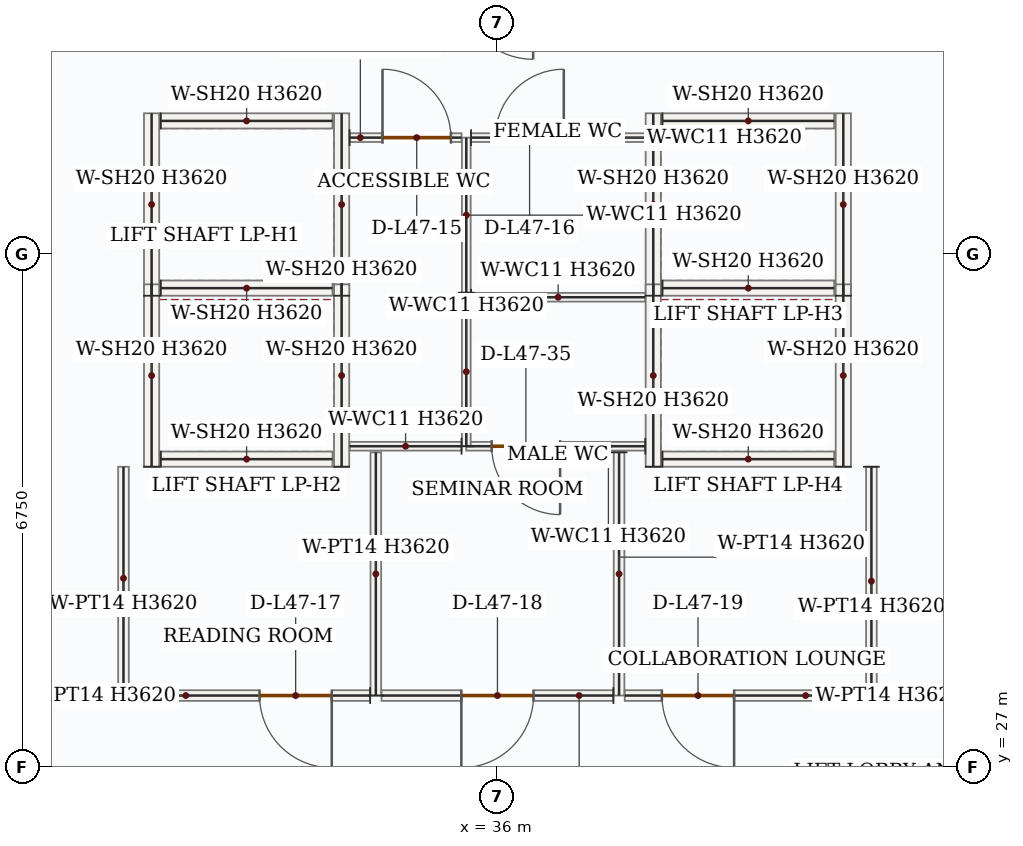
"""IFC4 building model, lengths in metres.
Left out: names, types, materials, properties, quantities, classifications, styles, units other than length and angle.
Written with IfcOpenShell. Run it as: python <this file> out.ifc"""

import sys

from ifc_helpers import new_model, si_unit, direction, frame, frame_2d, origin, place, context, subcontext, project, spatial, rectangle, extrude, source, transform, mapped, element, fill, save


model = new_model("IFC4")
c1 = context("Model", 3, precision=1e-05, world=origin(), true_north=direction((0.0, 1.0)))
c2 = subcontext(c1, "Body", "Model", "MODEL_VIEW")
j1 = project(units=[si_unit("LENGTHUNIT", "METRE"), si_unit("PLANEANGLEUNIT", "RADIAN")], contexts=[c1])
p1 = place(None, origin())
s1 = spatial("IfcSite", under=j1, at=p1, CompositionType="ELEMENT")
p2 = place(p1, origin())
s2 = spatial("IfcBuilding", under=s1, at=p2, CompositionType="ELEMENT")
p3 = place(p2, frame((0.0, 0.0, 201.9)))
s3 = spatial("IfcBuildingStorey", under=s2, at=p3, CompositionType="ELEMENT", Elevation=201.9)
m1 = source(origin(), c2, "Body", "SweptSolid", [
    extrude(rectangle(XDim=2.4, YDim=0.2, at=frame_2d((1.2, 0.0))), origin(), (0.0, 0.0, 1.0), 3.62),
])
for number, where, z_axis, x_axis in (
    (1, (31.45, 33.2, 0.0), (0.0, 0.0, 1.0), (0.0, 1.0, 0.0)),
    (2, (33.95, 33.2, 0.0), (0.0, 0.0, 1.0), (0.0, 1.0, 0.0)),
):
    element("IfcWall", number, at=place(p3, frame(where, z_axis=z_axis, x_axis=x_axis)), inside=s3, PredefinedType="SOLIDWALL", context=c2, shape_type="MappedRepresentation", body=[
        mapped(m1, transform((0.0, 0.0, 0.0), x_axis=(1.0, 0.0, 0.0), y_axis=(0.0, 1.0, 0.0), z_axis=(0.0, 0.0, 1.0), scale=1.0)),
    ])
m2 = source(origin(), c2, "Body", "SweptSolid", [
    extrude(rectangle(XDim=2.26, YDim=0.2, at=frame_2d((1.13, 0.0))), origin(), (0.0, 0.0, 1.0), 3.62),
])
for number, where, z_axis, x_axis in (
    (3, (31.57, 33.3, 0.0), (0.0, 0.0, 1.0), (1.0, 0.0, 0.0)),
    (4, (31.57, 35.5, 0.0), (0.0, 0.0, 1.0), (1.0, 0.0, 0.0)),
):
    element("IfcWall", number, at=place(p3, frame(where, z_axis=z_axis, x_axis=x_axis)), inside=s3, PredefinedType="SOLIDWALL", context=c2, shape_type="MappedRepresentation", body=[
        mapped(m2, transform((0.0, 0.0, 0.0), x_axis=(1.0, 0.0, 0.0), y_axis=(0.0, 1.0, 0.0), z_axis=(0.0, 0.0, 1.0), scale=1.0)),
    ])
for number, where, z_axis, x_axis in (
    (5, (31.45, 30.95, 0.0), (0.0, 0.0, 1.0), (0.0, 1.0, 0.0)),
    (6, (33.95, 30.95, 0.0), (0.0, 0.0, 1.0), (0.0, 1.0, 0.0)),
):
    element("IfcWall", number, at=place(p3, frame(where, z_axis=z_axis, x_axis=x_axis)), inside=s3, PredefinedType="SOLIDWALL", context=c2, shape_type="MappedRepresentation", body=[
        mapped(m1, transform((0.0, 0.0, 0.0), x_axis=(1.0, 0.0, 0.0), y_axis=(0.0, 1.0, 0.0), z_axis=(0.0, 0.0, 1.0), scale=1.0)),
    ])
p4 = place(p3, frame((31.57, 31.05, 0.0), z_axis=(0.0, 0.0, 1.0), x_axis=(1.0, 0.0, 0.0)))
e7 = element("IfcWall", 7, at=p4, inside=s3, PredefinedType="SOLIDWALL", context=c2, shape_type="MappedRepresentation", body=[
    mapped(m2, transform((0.0, 0.0, 0.0), x_axis=(1.0, 0.0, 0.0), y_axis=(0.0, 1.0, 0.0), z_axis=(0.0, 0.0, 1.0), scale=1.0)),
])
for number, where, z_axis, x_axis in (
    (8, (38.05, 33.2, 0.0), (0.0, 0.0, 1.0), (0.0, 1.0, 0.0)),
    (9, (40.55, 33.2, 0.0), (0.0, 0.0, 1.0), (0.0, 1.0, 0.0)),
):
    element("IfcWall", number, at=place(p3, frame(where, z_axis=z_axis, x_axis=x_axis)), inside=s3, PredefinedType="SOLIDWALL", context=c2, shape_type="MappedRepresentation", body=[
        mapped(m1, transform((0.0, 0.0, 0.0), x_axis=(1.0, 0.0, 0.0), y_axis=(0.0, 1.0, 0.0), z_axis=(0.0, 0.0, 1.0), scale=1.0)),
    ])
for number, where, z_axis, x_axis in (
    (10, (38.17, 33.3, 0.0), (0.0, 0.0, 1.0), (1.0, 0.0, 0.0)),
    (11, (38.17, 35.5, 0.0), (0.0, 0.0, 1.0), (1.0, 0.0, 0.0)),
):
    element("IfcWall", number, at=place(p3, frame(where, z_axis=z_axis, x_axis=x_axis)), inside=s3, PredefinedType="SOLIDWALL", context=c2, shape_type="MappedRepresentation", body=[
        mapped(m2, transform((0.0, 0.0, 0.0), x_axis=(1.0, 0.0, 0.0), y_axis=(0.0, 1.0, 0.0), z_axis=(0.0, 0.0, 1.0), scale=1.0)),
    ])
for number, where, z_axis, x_axis in (
    (12, (38.05, 30.95, 0.0), (0.0, 0.0, 1.0), (0.0, 1.0, 0.0)),
    (13, (40.55, 30.95, 0.0), (0.0, 0.0, 1.0), (0.0, 1.0, 0.0)),
):
    element("IfcWall", number, at=place(p3, frame(where, z_axis=z_axis, x_axis=x_axis)), inside=s3, PredefinedType="SOLIDWALL", context=c2, shape_type="MappedRepresentation", body=[
        mapped(m1, transform((0.0, 0.0, 0.0), x_axis=(1.0, 0.0, 0.0), y_axis=(0.0, 1.0, 0.0), z_axis=(0.0, 0.0, 1.0), scale=1.0)),
    ])
p5 = place(p3, frame((38.17, 31.05, 0.0), z_axis=(0.0, 0.0, 1.0), x_axis=(1.0, 0.0, 0.0)))
e14 = element("IfcWall", 14, at=p5, inside=s3, PredefinedType="SOLIDWALL", context=c2, shape_type="MappedRepresentation", body=[
    mapped(m2, transform((0.0, 0.0, 0.0), x_axis=(1.0, 0.0, 0.0), y_axis=(0.0, 1.0, 0.0), z_axis=(0.0, 0.0, 1.0), scale=1.0)),
])
p6 = place(p3, frame((37.945, 31.22, 0.0), z_axis=(0.0, 0.0, 1.0), x_axis=(-1.0, 0.0, 0.0)))
e15 = element("IfcWall", 15, at=p6, inside=s3, PredefinedType="PARTITIONING", context=c2, shape_type="SweptSolid", body=[
    extrude(rectangle(XDim=2.355, YDim=0.115, at=frame_2d((1.177, 0.0))), origin(), (0.0, 0.0, 1.0), 3.62),
])
p7 = place(p6, frame((1.121, 0.0, 0.0)))
e16 = element("IfcOpeningElement", 16, at=p7, cuts=e15, PredefinedType="OPENING", context=c2, shape_type="SweptSolid", body=[
    extrude(rectangle(XDim=0.9, YDim=2.1, at=frame_2d((0.45, 1.05))), frame((0.0, 0.067, 0.0), z_axis=(0.0, -1.0, 0.0), x_axis=(1.0, 0.0, 0.0)), (0.0, 0.0, 1.0), 0.135),
])
m3 = source(origin(), c2, "Body", "SweptSolid", [
    extrude(rectangle(XDim=1.96, YDim=0.115, at=frame_2d((0.98, 0.0))), origin(), (0.0, 0.0, 1.0), 3.62),
])
p8 = place(p3, frame((35.59, 31.22, 0.0), z_axis=(0.0, 0.0, 1.0), x_axis=(0.0, 1.0, 0.0)))
e17 = element("IfcWall", 17, at=p8, inside=s3, PredefinedType="PARTITIONING", context=c2, shape_type="MappedRepresentation", body=[
    mapped(m3, transform((0.0, 0.0, 0.0), x_axis=(1.0, 0.0, 0.0), y_axis=(0.0, 1.0, 0.0), z_axis=(0.0, 0.0, 1.0), scale=1.0)),
])
m4 = source(origin(), c2, "Body", "SweptSolid", [
    extrude(rectangle(XDim=2.292, YDim=0.115, at=frame_2d((1.146, 0.0))), origin(), (0.0, 0.0, 1.0), 3.62),
])
p9 = place(p3, frame((35.653, 33.18, 0.0), z_axis=(0.0, 0.0, 1.0), x_axis=(1.0, 0.0, 0.0)))
e18 = element("IfcWall", 18, at=p9, inside=s3, PredefinedType="PARTITIONING", context=c2, shape_type="MappedRepresentation", body=[
    mapped(m4, transform((0.0, 0.0, 0.0), x_axis=(1.0, 0.0, 0.0), y_axis=(0.0, 1.0, 0.0), z_axis=(0.0, 0.0, 1.0), scale=1.0)),
])
m5 = source(origin(), c2, "Body", "SweptSolid", [
    extrude(rectangle(XDim=2.04, YDim=0.115, at=frame_2d((1.02, 0.0))), origin(), (0.0, 0.0, 1.0), 3.62),
])
p10 = place(p3, frame((35.59, 33.24, 0.0), z_axis=(0.0, 0.0, 1.0), x_axis=(0.0, 1.0, 0.0)))
e19 = element("IfcWall", 19, at=p10, inside=s3, PredefinedType="PARTITIONING", context=c2, shape_type="MappedRepresentation", body=[
    mapped(m5, transform((0.0, 0.0, 0.0), x_axis=(1.0, 0.0, 0.0), y_axis=(0.0, 1.0, 0.0), z_axis=(0.0, 0.0, 1.0), scale=1.0)),
])
p11 = place(p3, frame((35.653, 35.28, 0.0), z_axis=(0.0, 0.0, 1.0), x_axis=(1.0, 0.0, 0.0)))
e20 = element("IfcWall", 20, at=p11, inside=s3, PredefinedType="PARTITIONING", context=c2, shape_type="SweptSolid", body=[
    extrude(rectangle(XDim=2.292, YDim=0.115, at=frame_2d((1.146, 0.0))), origin(), (0.0, 0.0, 1.0), 3.62),
])
p12 = place(p11, frame((0.32, 0.0, 0.0)))
e21 = element("IfcOpeningElement", 21, at=p12, cuts=e20, PredefinedType="OPENING", context=c2, shape_type="SweptSolid", body=[
    extrude(rectangle(XDim=0.9, YDim=2.1, at=frame_2d((0.45, 1.05))), frame((0.0, 0.067, 0.0), z_axis=(0.0, -1.0, 0.0), x_axis=(1.0, 0.0, 0.0)), (0.0, 0.0, 1.0), 0.135),
])
m6 = source(origin(), c2, "Body", "SweptSolid", [
    extrude(rectangle(XDim=1.473, YDim=0.115, at=frame_2d((0.736, 0.0))), origin(), (0.0, 0.0, 1.0), 3.62),
])
p13 = place(p3, frame((35.528, 31.22, 0.0), z_axis=(0.0, 0.0, 1.0), x_axis=(-1.0, 0.0, 0.0)))
e22 = element("IfcWall", 22, at=p13, inside=s3, PredefinedType="PARTITIONING", context=c2, shape_type="MappedRepresentation", body=[
    mapped(m6, transform((0.0, 0.0, 0.0), x_axis=(1.0, 0.0, 0.0), y_axis=(0.0, 1.0, 0.0), z_axis=(0.0, 0.0, 1.0), scale=1.0)),
])
p14 = place(p3, frame((34.055, 35.28, 0.0), z_axis=(0.0, 0.0, 1.0), x_axis=(1.0, 0.0, 0.0)))
e23 = element("IfcWall", 23, at=p14, inside=s3, PredefinedType="PARTITIONING", context=c2, shape_type="SweptSolid", body=[
    extrude(rectangle(XDim=1.473, YDim=0.115, at=frame_2d((0.736, 0.0))), origin(), (0.0, 0.0, 1.0), 3.62),
])
p15 = place(p14, frame((0.433, 0.0, 0.0)))
e24 = element("IfcOpeningElement", 24, at=p15, cuts=e23, PredefinedType="OPENING", context=c2, shape_type="SweptSolid", body=[
    extrude(rectangle(XDim=0.9, YDim=2.1, at=frame_2d((0.45, 1.05))), frame((0.0, 0.067, 0.0), z_axis=(0.0, -1.0, 0.0), x_axis=(1.0, 0.0, 0.0)), (0.0, 0.0, 1.0), 0.135),
])
m7 = source(origin(), c2, "Body", "SweptSolid", [
    extrude(rectangle(XDim=3.2, YDim=0.14, at=frame_2d((1.6, 0.0))), origin(), (0.0, 0.0, 1.0), 3.62),
])
for number, where, z_axis, x_axis in (
    (25, (34.4, 27.94, 0.0), (0.0, 0.0, 1.0), (0.0, 1.0, 0.0)),
    (26, (37.6, 31.14, 0.0), (0.0, 0.0, 1.0), (0.0, -1.0, 0.0)),
):
    element("IfcWall", number, at=place(p3, frame(where, z_axis=z_axis, x_axis=x_axis)), inside=s3, PredefinedType="PARTITIONING", context=c2, shape_type="MappedRepresentation", body=[
        mapped(m7, transform((0.0, 0.0, 0.0), x_axis=(1.0, 0.0, 0.0), y_axis=(0.0, 1.0, 0.0), z_axis=(0.0, 0.0, 1.0), scale=1.0)),
    ])
p16 = place(p3, frame((37.525, 27.94, 0.0), z_axis=(0.0, 0.0, 1.0), x_axis=(-1.0, 0.0, 0.0)))
e27 = element("IfcWall", 27, at=p16, inside=s3, PredefinedType="PARTITIONING", context=c2, shape_type="SweptSolid", body=[
    extrude(rectangle(XDim=3.05, YDim=0.14, at=frame_2d((1.525, 0.0))), origin(), (0.0, 0.0, 1.0), 3.62),
])
p17 = place(p16, frame((1.05, 0.0, 0.0)))
e28 = element("IfcOpeningElement", 28, at=p17, cuts=e27, PredefinedType="OPENING", context=c2, shape_type="SweptSolid", body=[
    extrude(rectangle(XDim=0.95, YDim=2.15, at=frame_2d((0.475, 1.075))), frame((0.0, 0.08, 0.0), z_axis=(0.0, -1.0, 0.0), x_axis=(1.0, 0.0, 0.0)), (0.0, 0.0, 1.0), 0.16),
])
p18 = place(p3, frame((34.325, 27.94, 0.0), z_axis=(0.0, 0.0, 1.0), x_axis=(-1.0, 0.0, 0.0)))
e29 = element("IfcWall", 29, at=p18, inside=s3, PredefinedType="PARTITIONING", context=c2, shape_type="SweptSolid", body=[
    extrude(rectangle(XDim=3.245, YDim=0.14, at=frame_2d((1.623, 0.0))), origin(), (0.0, 0.0, 1.0), 3.62),
])
p19 = place(p18, frame((0.505, 0.0, 0.0)))
e30 = element("IfcOpeningElement", 30, at=p19, cuts=e29, PredefinedType="OPENING", context=c2, shape_type="SweptSolid", body=[
    extrude(rectangle(XDim=0.95, YDim=2.15, at=frame_2d((0.475, 1.075))), frame((0.0, 0.08, 0.0), z_axis=(0.0, -1.0, 0.0), x_axis=(1.0, 0.0, 0.0)), (0.0, 0.0, 1.0), 0.16),
])
m8 = source(origin(), c2, "Body", "SweptSolid", [
    extrude(rectangle(XDim=2.935, YDim=0.14, at=frame_2d((1.468, 0.0))), origin(), (0.0, 0.0, 1.0), 3.62),
])
p20 = place(p3, frame((31.08, 28.015, 0.0), z_axis=(0.0, 0.0, 1.0), x_axis=(0.0, 1.0, 0.0)))
e31 = element("IfcWall", 31, at=p20, inside=s3, PredefinedType="PARTITIONING", context=c2, shape_type="MappedRepresentation", body=[
    mapped(m8, transform((0.0, 0.0, 0.0), x_axis=(1.0, 0.0, 0.0), y_axis=(0.0, 1.0, 0.0), z_axis=(0.0, 0.0, 1.0), scale=1.0)),
])
m9 = source(origin(), c2, "Body", "SweptSolid", [
    extrude(rectangle(XDim=3.01, YDim=0.14, at=frame_2d((1.505, 0.0))), origin(), (0.0, 0.0, 1.0), 3.62),
])
p21 = place(p3, frame((40.92, 30.95, 0.0), z_axis=(0.0, 0.0, 1.0), x_axis=(0.0, -1.0, 0.0)))
e32 = element("IfcWall", 32, at=p21, inside=s3, PredefinedType="PARTITIONING", context=c2, shape_type="MappedRepresentation", body=[
    mapped(m9, transform((0.0, 0.0, 0.0), x_axis=(1.0, 0.0, 0.0), y_axis=(0.0, 1.0, 0.0), z_axis=(0.0, 0.0, 1.0), scale=1.0)),
])
p22 = place(p3, frame((40.845, 27.94, 0.0), z_axis=(0.0, 0.0, 1.0), x_axis=(-1.0, 0.0, 0.0)))
e33 = element("IfcWall", 33, at=p22, inside=s3, PredefinedType="PARTITIONING", context=c2, shape_type="SweptSolid", body=[
    extrude(rectangle(XDim=3.17, YDim=0.14, at=frame_2d((1.585, 0.0))), origin(), (0.0, 0.0, 1.0), 3.62),
])
p23 = place(p22, frame((1.732, 0.0, 0.0)))
e34 = element("IfcOpeningElement", 34, at=p23, cuts=e33, PredefinedType="OPENING", context=c2, shape_type="SweptSolid", body=[
    extrude(rectangle(XDim=0.95, YDim=2.15, at=frame_2d((0.475, 1.075))), frame((0.0, 0.08, 0.0), z_axis=(0.0, -1.0, 0.0), x_axis=(1.0, 0.0, 0.0)), (0.0, 0.0, 1.0), 0.16),
])
m10 = source(origin(), c2, "Body", "SweptSolid", [
    extrude(rectangle(XDim=0.9, YDim=2.1, at=frame_2d((0.45, 1.05))), frame((0.0, 0.025, 0.0), z_axis=(0.0, -1.0, 0.0), x_axis=(1.0, 0.0, 0.0)), (0.0, 0.0, 1.0), 0.05),
])
p24 = place(p15, origin())
e35 = element("IfcDoor", 35, at=p24, inside=s3, OperationType="SINGLE_SWING_LEFT", PredefinedType="DOOR", context=c2, shape_type="MappedRepresentation", body=[
    mapped(m10, transform((0.0, 0.0, 0.0), x_axis=(1.0, 0.0, 0.0), y_axis=(0.0, 1.0, 0.0), z_axis=(0.0, 0.0, 1.0), scale=1.0)),
])
fill(e24, e35)
p25 = place(p12, origin())
e36 = element("IfcDoor", 36, at=p25, inside=s3, OperationType="SINGLE_SWING_RIGHT", PredefinedType="DOOR", context=c2, shape_type="MappedRepresentation", body=[
    mapped(m10, transform((0.0, 0.0, 0.0), x_axis=(1.0, 0.0, 0.0), y_axis=(0.0, 1.0, 0.0), z_axis=(0.0, 0.0, 1.0), scale=1.0)),
])
fill(e21, e36)
m11 = source(origin(), c2, "Body", "SweptSolid", [
    extrude(rectangle(XDim=0.95, YDim=2.15, at=frame_2d((0.475, 1.075))), frame((0.0, 0.025, 0.0), z_axis=(0.0, -1.0, 0.0), x_axis=(1.0, 0.0, 0.0)), (0.0, 0.0, 1.0), 0.05),
])
p26 = place(p19, origin())
e37 = element("IfcDoor", 37, at=p26, inside=s3, OperationType="SINGLE_SWING_LEFT", PredefinedType="DOOR", context=c2, shape_type="MappedRepresentation", body=[
    mapped(m11, transform((0.0, 0.0, 0.0), x_axis=(1.0, 0.0, 0.0), y_axis=(0.0, 1.0, 0.0), z_axis=(0.0, 0.0, 1.0), scale=1.0)),
])
fill(e30, e37)
p27 = place(p17, origin())
e38 = element("IfcDoor", 38, at=p27, inside=s3, OperationType="SINGLE_SWING_RIGHT", PredefinedType="DOOR", context=c2, shape_type="MappedRepresentation", body=[
    mapped(m11, transform((0.0, 0.0, 0.0), x_axis=(1.0, 0.0, 0.0), y_axis=(0.0, 1.0, 0.0), z_axis=(0.0, 0.0, 1.0), scale=1.0)),
])
fill(e28, e38)
p28 = place(p23, origin())
e39 = element("IfcDoor", 39, at=p28, inside=s3, OperationType="SINGLE_SWING_LEFT", PredefinedType="DOOR", context=c2, shape_type="MappedRepresentation", body=[
    mapped(m11, transform((0.0, 0.0, 0.0), x_axis=(1.0, 0.0, 0.0), y_axis=(0.0, 1.0, 0.0), z_axis=(0.0, 0.0, 1.0), scale=1.0)),
])
fill(e34, e39)
p29 = place(p7, origin())
e40 = element("IfcDoor", 40, at=p29, inside=s3, OperationType="SINGLE_SWING_LEFT", PredefinedType="DOOR", context=c2, shape_type="MappedRepresentation", body=[
    mapped(m10, transform((0.0, 0.0, 0.0), x_axis=(1.0, 0.0, 0.0), y_axis=(0.0, 1.0, 0.0), z_axis=(0.0, 0.0, 1.0), scale=1.0)),
])
fill(e16, e40)
save(model, sys.argv[1])
